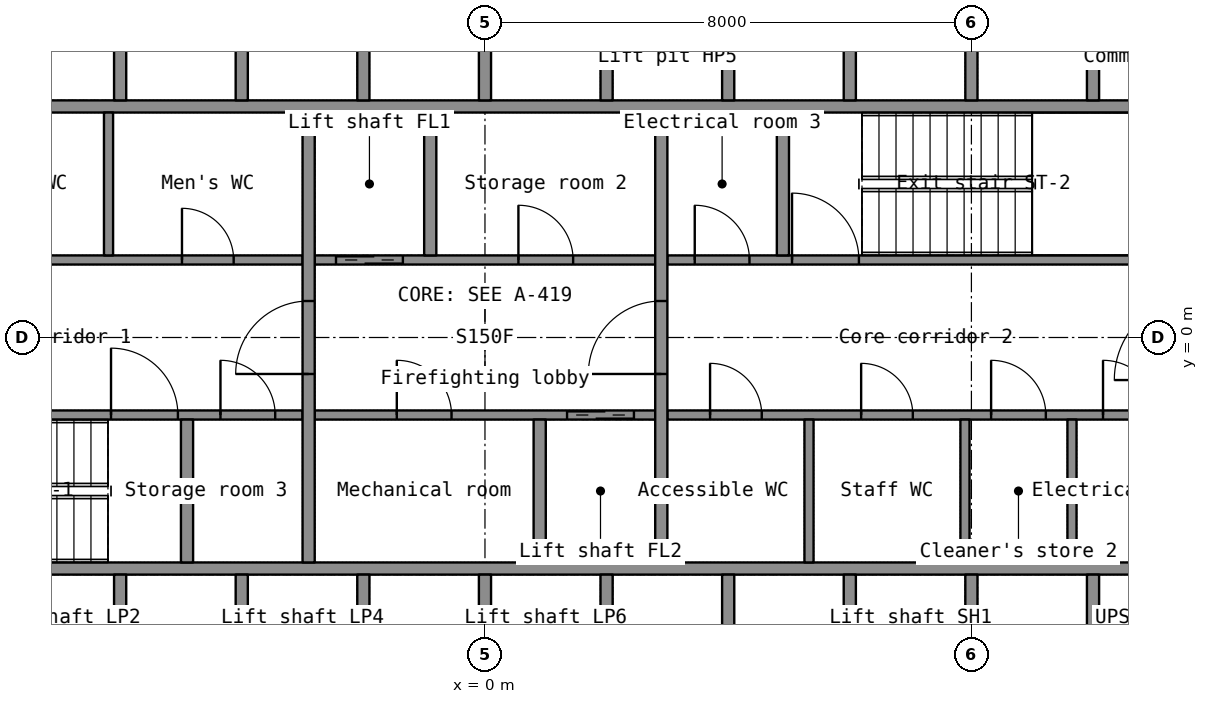
"""IFC4 building model, lengths in metres.
Left out: names, types, materials, properties, quantities, classifications, styles, units other than length and angle.
Written with IfcOpenShell. Run it as: python <this file> out.ifc"""

import sys

from ifc_helpers import new_model, si_unit, direction, frame, frame_2d, origin, place, context, subcontext, project, spatial, rectangle, extrude, element, fill, save


model = new_model("IFC4")
c1 = context("Model", 3, precision=1e-05, world=origin(), true_north=direction((0.0, 1.0)))
c2 = subcontext(c1, "Body", "Model", "MODEL_VIEW")
j1 = project(units=[si_unit("LENGTHUNIT", "METRE"), si_unit("PLANEANGLEUNIT", "RADIAN")], contexts=[c1])
p1 = place(None, origin())
s1 = spatial("IfcSite", under=j1, at=p1, CompositionType="ELEMENT")
p2 = place(p1, origin())
s2 = spatial("IfcBuilding", under=s1, at=p2, CompositionType="ELEMENT")
p3 = place(p2, frame((0.0, 0.0, 141.5)))
s3 = spatial("IfcBuildingStorey", under=s2, at=p3, CompositionType="ELEMENT", Elevation=141.5)
for number, where, z_axis, x_axis in (
    (1, (-11.5, -3.8, 0.0), (0.0, 0.0, 1.0), (1.0, 0.0, 0.0)),
    (2, (-11.5, 3.8, 0.0), (0.0, 0.0, 1.0), (1.0, 0.0, 0.0)),
):
    element("IfcWall", number, at=place(p3, frame(where, z_axis=z_axis, x_axis=x_axis)), inside=s3, PredefinedType="SHEAR", context=c2, shape_type="SweptSolid", body=[
        extrude(rectangle(XDim=23.0, YDim=0.2, at=frame_2d((11.5, 0.0))), origin(), (0.0, 0.0, 1.0), 3.3),
    ])
for number, where, z_axis, x_axis in (
    (3, (-6.0, -6.7, 0.0), (0.0, 0.0, 1.0), (0.0, 1.0, 0.0)),
    (4, (-4.0, -6.7, 0.0), (0.0, 0.0, 1.0), (0.0, 1.0, 0.0)),
    (5, (-2.0, -6.7, 0.0), (0.0, 0.0, 1.0), (0.0, 1.0, 0.0)),
    (6, (0.0, -6.7, 0.0), (0.0, 0.0, 1.0), (0.0, 1.0, 0.0)),
    (7, (2.0, -6.7, 0.0), (0.0, 0.0, 1.0), (0.0, 1.0, 0.0)),
    (8, (4.0, -6.7, 0.0), (0.0, 0.0, 1.0), (0.0, 1.0, 0.0)),
    (9, (6.0, -6.7, 0.0), (0.0, 0.0, 1.0), (0.0, 1.0, 0.0)),
    (10, (8.0, -6.7, 0.0), (0.0, 0.0, 1.0), (0.0, 1.0, 0.0)),
    (11, (10.0, -6.7, 0.0), (0.0, 0.0, 1.0), (0.0, 1.0, 0.0)),
    (12, (-6.0, 3.9, 0.0), (0.0, 0.0, 1.0), (0.0, 1.0, 0.0)),
    (13, (-4.0, 3.9, 0.0), (0.0, 0.0, 1.0), (0.0, 1.0, 0.0)),
    (14, (-2.0, 3.9, 0.0), (0.0, 0.0, 1.0), (0.0, 1.0, 0.0)),
    (15, (0.0, 3.9, 0.0), (0.0, 0.0, 1.0), (0.0, 1.0, 0.0)),
    (16, (2.0, 3.9, 0.0), (0.0, 0.0, 1.0), (0.0, 1.0, 0.0)),
    (17, (4.0, 3.9, 0.0), (0.0, 0.0, 1.0), (0.0, 1.0, 0.0)),
    (18, (6.0, 3.9, 0.0), (0.0, 0.0, 1.0), (0.0, 1.0, 0.0)),
    (19, (8.0, 3.9, 0.0), (0.0, 0.0, 1.0), (0.0, 1.0, 0.0)),
    (20, (10.0, 3.9, 0.0), (0.0, 0.0, 1.0), (0.0, 1.0, 0.0)),
):
    element("IfcWall", number, at=place(p3, frame(where, z_axis=z_axis, x_axis=x_axis)), inside=s3, PredefinedType="SHEAR", context=c2, shape_type="SweptSolid", body=[
        extrude(rectangle(XDim=2.8, YDim=0.2, at=frame_2d((1.4, 0.0))), origin(), (0.0, 0.0, 1.0), 3.3),
    ])
p4 = place(p3, frame((-11.5, -1.275, 0.0), z_axis=(0.0, 0.0, 1.0), x_axis=(1.0, 0.0, 0.0)))
e21 = element("IfcWall", 21, at=p4, inside=s3, PredefinedType="SHEAR", context=c2, shape_type="SweptSolid", body=[
    extrude(rectangle(XDim=8.5, YDim=0.15, at=frame_2d((4.25, 0.0))), origin(), (0.0, 0.0, 1.0), 3.3),
])
p5 = place(p4, frame((5.35, 0.0, 0.0)))
e22 = element("IfcOpeningElement", 22, at=p5, cuts=e21, PredefinedType="OPENING", context=c2, shape_type="SweptSolid", body=[
    extrude(rectangle(XDim=1.1, YDim=2.15, at=frame_2d((0.55, 1.075))), frame((0.0, 0.085, 0.0), z_axis=(0.0, -1.0, 0.0), x_axis=(1.0, 0.0, 0.0)), (0.0, 0.0, 1.0), 0.17),
])
p6 = place(p4, frame((7.15, 0.0, 0.0)))
e23 = element("IfcOpeningElement", 23, at=p6, cuts=e21, PredefinedType="OPENING", context=c2, shape_type="SweptSolid", body=[
    extrude(rectangle(XDim=0.9, YDim=2.1, at=frame_2d((0.45, 1.05))), frame((0.0, 0.085, 0.0), z_axis=(0.0, -1.0, 0.0), x_axis=(1.0, 0.0, 0.0)), (0.0, 0.0, 1.0), 0.17),
])
p7 = place(p3, frame((-2.8, -1.275, 0.0), z_axis=(0.0, 0.0, 1.0), x_axis=(1.0, 0.0, 0.0)))
e24 = element("IfcWall", 24, at=p7, inside=s3, PredefinedType="SHEAR", context=c2, shape_type="SweptSolid", body=[
    extrude(rectangle(XDim=5.6, YDim=0.15, at=frame_2d((2.8, 0.0))), origin(), (0.0, 0.0, 1.0), 3.3),
])
p8 = place(p7, frame((4.15, 0.0, 0.0)))
e25 = element("IfcOpeningElement", 25, at=p8, cuts=e24, PredefinedType="OPENING", context=c2, shape_type="SweptSolid", body=[
    extrude(rectangle(XDim=1.1, YDim=2.2, at=frame_2d((0.55, 1.1))), frame((0.0, 0.085, 0.0), z_axis=(0.0, -1.0, 0.0), x_axis=(1.0, 0.0, 0.0)), (0.0, 0.0, 1.0), 0.17),
])
p9 = place(p7, frame((1.35, 0.0, 0.0)))
e26 = element("IfcOpeningElement", 26, at=p9, cuts=e24, PredefinedType="OPENING", context=c2, shape_type="SweptSolid", body=[
    extrude(rectangle(XDim=0.9, YDim=2.1, at=frame_2d((0.45, 1.05))), frame((0.0, 0.085, 0.0), z_axis=(0.0, -1.0, 0.0), x_axis=(1.0, 0.0, 0.0)), (0.0, 0.0, 1.0), 0.17),
])
p10 = place(p3, frame((3.0, -1.275, 0.0), z_axis=(0.0, 0.0, 1.0), x_axis=(1.0, 0.0, 0.0)))
e27 = element("IfcWall", 27, at=p10, inside=s3, PredefinedType="PARTITIONING", context=c2, shape_type="SweptSolid", body=[
    extrude(rectangle(XDim=8.5, YDim=0.15, at=frame_2d((4.25, 0.0))), origin(), (0.0, 0.0, 1.0), 3.3),
])
p11 = place(p10, frame((0.702, 0.0, 0.0)))
e28 = element("IfcOpeningElement", 28, at=p11, cuts=e27, PredefinedType="OPENING", context=c2, shape_type="SweptSolid", body=[
    extrude(rectangle(XDim=0.85, YDim=2.1, at=frame_2d((0.425, 1.05))), frame((0.0, 0.085, 0.0), z_axis=(0.0, -1.0, 0.0), x_axis=(1.0, 0.0, 0.0)), (0.0, 0.0, 1.0), 0.17),
])
p12 = place(p10, frame((3.187, 0.0, 0.0)))
e29 = element("IfcOpeningElement", 29, at=p12, cuts=e27, PredefinedType="OPENING", context=c2, shape_type="SweptSolid", body=[
    extrude(rectangle(XDim=0.85, YDim=2.1, at=frame_2d((0.425, 1.05))), frame((0.0, 0.085, 0.0), z_axis=(0.0, -1.0, 0.0), x_axis=(1.0, 0.0, 0.0)), (0.0, 0.0, 1.0), 0.17),
])
p13 = place(p10, frame((5.324, 0.0, 0.0)))
e30 = element("IfcOpeningElement", 30, at=p13, cuts=e27, PredefinedType="OPENING", context=c2, shape_type="SweptSolid", body=[
    extrude(rectangle(XDim=0.9, YDim=2.1, at=frame_2d((0.45, 1.05))), frame((0.0, 0.085, 0.0), z_axis=(0.0, -1.0, 0.0), x_axis=(1.0, 0.0, 0.0)), (0.0, 0.0, 1.0), 0.17),
])
p14 = place(p10, frame((7.165, 0.0, 0.0)))
e31 = element("IfcOpeningElement", 31, at=p14, cuts=e27, PredefinedType="OPENING", context=c2, shape_type="SweptSolid", body=[
    extrude(rectangle(XDim=0.9, YDim=2.1, at=frame_2d((0.45, 1.05))), frame((0.0, 0.085, 0.0), z_axis=(0.0, -1.0, 0.0), x_axis=(1.0, 0.0, 0.0)), (0.0, 0.0, 1.0), 0.17),
])
p15 = place(p3, frame((-11.5, 1.275, 0.0), z_axis=(0.0, 0.0, 1.0), x_axis=(1.0, 0.0, 0.0)))
e32 = element("IfcWall", 32, at=p15, inside=s3, PredefinedType="PARTITIONING", context=c2, shape_type="SweptSolid", body=[
    extrude(rectangle(XDim=8.5, YDim=0.15, at=frame_2d((4.25, 0.0))), origin(), (0.0, 0.0, 1.0), 3.3),
])
p16 = place(p15, frame((0.534, 0.0, 0.0)))
e33 = element("IfcOpeningElement", 33, at=p16, cuts=e32, PredefinedType="OPENING", context=c2, shape_type="SweptSolid", body=[
    extrude(rectangle(XDim=0.9, YDim=2.1, at=frame_2d((0.45, 1.05))), frame((0.0, 0.085, 0.0), z_axis=(0.0, -1.0, 0.0), x_axis=(1.0, 0.0, 0.0)), (0.0, 0.0, 1.0), 0.17),
])
p17 = place(p15, frame((3.251, 0.0, 0.0)))
e34 = element("IfcOpeningElement", 34, at=p17, cuts=e32, PredefinedType="OPENING", context=c2, shape_type="SweptSolid", body=[
    extrude(rectangle(XDim=0.85, YDim=2.1, at=frame_2d((0.425, 1.05))), frame((0.0, 0.085, 0.0), z_axis=(0.0, -1.0, 0.0), x_axis=(1.0, 0.0, 0.0)), (0.0, 0.0, 1.0), 0.17),
])
p18 = place(p15, frame((6.517, 0.0, 0.0)))
e35 = element("IfcOpeningElement", 35, at=p18, cuts=e32, PredefinedType="OPENING", context=c2, shape_type="SweptSolid", body=[
    extrude(rectangle(XDim=0.85, YDim=2.1, at=frame_2d((0.425, 1.05))), frame((0.0, 0.085, 0.0), z_axis=(0.0, -1.0, 0.0), x_axis=(1.0, 0.0, 0.0)), (0.0, 0.0, 1.0), 0.17),
])
p19 = place(p3, frame((-2.8, 1.275, 0.0), z_axis=(0.0, 0.0, 1.0), x_axis=(1.0, 0.0, 0.0)))
e36 = element("IfcWall", 36, at=p19, inside=s3, PredefinedType="SHEAR", context=c2, shape_type="SweptSolid", body=[
    extrude(rectangle(XDim=5.6, YDim=0.15, at=frame_2d((2.8, 0.0))), origin(), (0.0, 0.0, 1.0), 3.3),
])
p20 = place(p19, frame((0.35, 0.0, 0.0)))
e37 = element("IfcOpeningElement", 37, at=p20, cuts=e36, PredefinedType="OPENING", context=c2, shape_type="SweptSolid", body=[
    extrude(rectangle(XDim=1.1, YDim=2.2, at=frame_2d((0.55, 1.1))), frame((0.0, 0.085, 0.0), z_axis=(0.0, -1.0, 0.0), x_axis=(1.0, 0.0, 0.0)), (0.0, 0.0, 1.0), 0.17),
])
p21 = place(p19, frame((3.35, 0.0, 0.0)))
e38 = element("IfcOpeningElement", 38, at=p21, cuts=e36, PredefinedType="OPENING", context=c2, shape_type="SweptSolid", body=[
    extrude(rectangle(XDim=0.9, YDim=2.1, at=frame_2d((0.45, 1.05))), frame((0.0, 0.085, 0.0), z_axis=(0.0, -1.0, 0.0), x_axis=(1.0, 0.0, 0.0)), (0.0, 0.0, 1.0), 0.17),
])
p22 = place(p3, frame((3.0, 1.275, 0.0), z_axis=(0.0, 0.0, 1.0), x_axis=(1.0, 0.0, 0.0)))
e39 = element("IfcWall", 39, at=p22, inside=s3, PredefinedType="SHEAR", context=c2, shape_type="SweptSolid", body=[
    extrude(rectangle(XDim=8.5, YDim=0.15, at=frame_2d((4.25, 0.0))), origin(), (0.0, 0.0, 1.0), 3.3),
])
p23 = place(p22, frame((2.05, 0.0, 0.0)))
e40 = element("IfcOpeningElement", 40, at=p23, cuts=e39, PredefinedType="OPENING", context=c2, shape_type="SweptSolid", body=[
    extrude(rectangle(XDim=1.1, YDim=2.15, at=frame_2d((0.55, 1.075))), frame((0.0, 0.085, 0.0), z_axis=(0.0, -1.0, 0.0), x_axis=(1.0, 0.0, 0.0)), (0.0, 0.0, 1.0), 0.17),
])
p24 = place(p22, frame((0.45, 0.0, 0.0)))
e41 = element("IfcOpeningElement", 41, at=p24, cuts=e39, PredefinedType="OPENING", context=c2, shape_type="SweptSolid", body=[
    extrude(rectangle(XDim=0.9, YDim=2.1, at=frame_2d((0.45, 1.05))), frame((0.0, 0.085, 0.0), z_axis=(0.0, -1.0, 0.0), x_axis=(1.0, 0.0, 0.0)), (0.0, 0.0, 1.0), 0.17),
])
p25 = place(p3, frame((-2.9, -3.7, 0.0), z_axis=(0.0, 0.0, 1.0), x_axis=(0.0, 1.0, 0.0)))
e42 = element("IfcWall", 42, at=p25, inside=s3, PredefinedType="SHEAR", context=c2, shape_type="SweptSolid", body=[
    extrude(rectangle(XDim=7.4, YDim=0.2, at=frame_2d((3.7, 0.0))), origin(), (0.0, 0.0, 1.0), 3.3),
])
p26 = place(p25, frame((3.1, 0.0, 0.0)))
e43 = element("IfcOpeningElement", 43, at=p26, cuts=e42, PredefinedType="OPENING", context=c2, shape_type="SweptSolid", body=[
    extrude(rectangle(XDim=1.2, YDim=2.2, at=frame_2d((0.6, 1.1))), frame((0.0, 0.11, 0.0), z_axis=(0.0, -1.0, 0.0), x_axis=(1.0, 0.0, 0.0)), (0.0, 0.0, 1.0), 0.22),
])
p27 = place(p3, frame((2.9, -3.7, 0.0), z_axis=(0.0, 0.0, 1.0), x_axis=(0.0, 1.0, 0.0)))
e44 = element("IfcWall", 44, at=p27, inside=s3, PredefinedType="SHEAR", context=c2, shape_type="SweptSolid", body=[
    extrude(rectangle(XDim=7.4, YDim=0.2, at=frame_2d((3.7, 0.0))), origin(), (0.0, 0.0, 1.0), 3.3),
])
p28 = place(p27, frame((3.1, 0.0, 0.0)))
e45 = element("IfcOpeningElement", 45, at=p28, cuts=e44, PredefinedType="OPENING", context=c2, shape_type="SweptSolid", body=[
    extrude(rectangle(XDim=1.2, YDim=2.2, at=frame_2d((0.6, 1.1))), frame((0.0, 0.11, 0.0), z_axis=(0.0, -1.0, 0.0), x_axis=(1.0, 0.0, 0.0)), (0.0, 0.0, 1.0), 0.22),
])
for number, where, z_axis, x_axis in (
    (46, (-0.9, 1.35, 0.0), (0.0, 0.0, 1.0), (0.0, 1.0, 0.0)),
    (47, (0.9, -3.7, 0.0), (0.0, 0.0, 1.0), (0.0, 1.0, 0.0)),
    (48, (-4.9, -3.7, 0.0), (0.0, 0.0, 1.0), (0.0, 1.0, 0.0)),
    (49, (4.9, 1.35, 0.0), (0.0, 0.0, 1.0), (0.0, 1.0, 0.0)),
):
    element("IfcWall", number, at=place(p3, frame(where, z_axis=z_axis, x_axis=x_axis)), inside=s3, PredefinedType="SHEAR", context=c2, shape_type="SweptSolid", body=[
        extrude(rectangle(XDim=2.35, YDim=0.2, at=frame_2d((1.175, 0.0))), origin(), (0.0, 0.0, 1.0), 3.3),
    ])
for number, where, z_axis, x_axis in (
    (50, (-6.191, 1.35, 0.0), (0.0, 0.0, 1.0), (0.0, 1.0, 0.0)),
    (51, (5.329, -3.7, 0.0), (0.0, 0.0, 1.0), (0.0, 1.0, 0.0)),
    (52, (7.894, -3.7, 0.0), (0.0, 0.0, 1.0), (0.0, 1.0, 0.0)),
    (53, (9.654, -3.7, 0.0), (0.0, 0.0, 1.0), (0.0, 1.0, 0.0)),
):
    element("IfcWall", number, at=place(p3, frame(where, z_axis=z_axis, x_axis=x_axis)), inside=s3, PredefinedType="PARTITIONING", context=c2, shape_type="SweptSolid", body=[
        extrude(rectangle(XDim=2.35, YDim=0.15, at=frame_2d((1.175, 0.0))), origin(), (0.0, 0.0, 1.0), 3.3),
    ])
p29 = place(p26, origin())
e54 = element("IfcDoor", 54, at=p29, inside=s3, OperationType="SINGLE_SWING_LEFT", PredefinedType="DOOR", context=c2, shape_type="SweptSolid", body=[
    extrude(rectangle(XDim=1.2, YDim=2.2, at=frame_2d((0.6, 1.1))), frame((0.0, 0.025, 0.0), z_axis=(0.0, -1.0, 0.0), x_axis=(1.0, 0.0, 0.0)), (0.0, 0.0, 1.0), 0.05),
])
fill(e43, e54)
p30 = place(p28, origin())
e55 = element("IfcDoor", 55, at=p30, inside=s3, OperationType="SINGLE_SWING_LEFT", PredefinedType="DOOR", context=c2, shape_type="SweptSolid", body=[
    extrude(rectangle(XDim=1.2, YDim=2.2, at=frame_2d((0.6, 1.1))), frame((0.0, 0.025, 0.0), z_axis=(0.0, -1.0, 0.0), x_axis=(1.0, 0.0, 0.0)), (0.0, 0.0, 1.0), 0.05),
])
fill(e45, e55)
p31 = place(p20, origin())
e56 = element("IfcDoor", 56, at=p31, inside=s3, OperationType="DOUBLE_DOOR_SLIDING", PredefinedType="DOOR", context=c2, shape_type="SweptSolid", body=[
    extrude(rectangle(XDim=1.1, YDim=2.2, at=frame_2d((0.55, 1.1))), frame((0.0, 0.025, 0.0), z_axis=(0.0, -1.0, 0.0), x_axis=(1.0, 0.0, 0.0)), (0.0, 0.0, 1.0), 0.05),
])
fill(e37, e56)
p32 = place(p8, origin())
e57 = element("IfcDoor", 57, at=p32, inside=s3, OperationType="DOUBLE_DOOR_SLIDING", PredefinedType="DOOR", context=c2, shape_type="SweptSolid", body=[
    extrude(rectangle(XDim=1.1, YDim=2.2, at=frame_2d((0.55, 1.1))), frame((0.0, 0.025, 0.0), z_axis=(0.0, -1.0, 0.0), x_axis=(1.0, 0.0, 0.0)), (0.0, 0.0, 1.0), 0.05),
])
fill(e25, e57)
p33 = place(p5, origin())
e58 = element("IfcDoor", 58, at=p33, inside=s3, OperationType="SINGLE_SWING_LEFT", PredefinedType="DOOR", context=c2, shape_type="SweptSolid", body=[
    extrude(rectangle(XDim=1.1, YDim=2.15, at=frame_2d((0.55, 1.075))), frame((0.0, 0.025, 0.0), z_axis=(0.0, -1.0, 0.0), x_axis=(1.0, 0.0, 0.0)), (0.0, 0.0, 1.0), 0.05),
])
fill(e22, e58)
p34 = place(p23, origin())
e59 = element("IfcDoor", 59, at=p34, inside=s3, OperationType="SINGLE_SWING_LEFT", PredefinedType="DOOR", context=c2, shape_type="SweptSolid", body=[
    extrude(rectangle(XDim=1.1, YDim=2.15, at=frame_2d((0.55, 1.075))), frame((0.0, 0.025, 0.0), z_axis=(0.0, -1.0, 0.0), x_axis=(1.0, 0.0, 0.0)), (0.0, 0.0, 1.0), 0.05),
])
fill(e40, e59)
p35 = place(p18, origin())
e60 = element("IfcDoor", 60, at=p35, inside=s3, OperationType="SINGLE_SWING_LEFT", PredefinedType="DOOR", context=c2, shape_type="SweptSolid", body=[
    extrude(rectangle(XDim=0.85, YDim=2.1, at=frame_2d((0.425, 1.05))), frame((0.0, 0.025, 0.0), z_axis=(0.0, -1.0, 0.0), x_axis=(1.0, 0.0, 0.0)), (0.0, 0.0, 1.0), 0.05),
])
fill(e35, e60)
p36 = place(p11, origin())
e61 = element("IfcDoor", 61, at=p36, inside=s3, OperationType="SINGLE_SWING_LEFT", PredefinedType="DOOR", context=c2, shape_type="SweptSolid", body=[
    extrude(rectangle(XDim=0.85, YDim=2.1, at=frame_2d((0.425, 1.05))), frame((0.0, 0.025, 0.0), z_axis=(0.0, -1.0, 0.0), x_axis=(1.0, 0.0, 0.0)), (0.0, 0.0, 1.0), 0.05),
])
fill(e28, e61)
p37 = place(p12, origin())
e62 = element("IfcDoor", 62, at=p37, inside=s3, OperationType="SINGLE_SWING_LEFT", PredefinedType="DOOR", context=c2, shape_type="SweptSolid", body=[
    extrude(rectangle(XDim=0.85, YDim=2.1, at=frame_2d((0.425, 1.05))), frame((0.0, 0.025, 0.0), z_axis=(0.0, -1.0, 0.0), x_axis=(1.0, 0.0, 0.0)), (0.0, 0.0, 1.0), 0.05),
])
fill(e29, e62)
p38 = place(p13, origin())
e63 = element("IfcDoor", 63, at=p38, inside=s3, OperationType="SINGLE_SWING_LEFT", PredefinedType="DOOR", context=c2, shape_type="SweptSolid", body=[
    extrude(rectangle(XDim=0.9, YDim=2.1, at=frame_2d((0.45, 1.05))), frame((0.0, 0.025, 0.0), z_axis=(0.0, -1.0, 0.0), x_axis=(1.0, 0.0, 0.0)), (0.0, 0.0, 1.0), 0.05),
])
fill(e30, e63)
p39 = place(p14, origin())
e64 = element("IfcDoor", 64, at=p39, inside=s3, OperationType="SINGLE_SWING_LEFT", PredefinedType="DOOR", context=c2, shape_type="SweptSolid", body=[
    extrude(rectangle(XDim=0.9, YDim=2.1, at=frame_2d((0.45, 1.05))), frame((0.0, 0.025, 0.0), z_axis=(0.0, -1.0, 0.0), x_axis=(1.0, 0.0, 0.0)), (0.0, 0.0, 1.0), 0.05),
])
fill(e31, e64)
p40 = place(p21, origin())
e65 = element("IfcDoor", 65, at=p40, inside=s3, OperationType="SINGLE_SWING_LEFT", PredefinedType="DOOR", context=c2, shape_type="SweptSolid", body=[
    extrude(rectangle(XDim=0.9, YDim=2.1, at=frame_2d((0.45, 1.05))), frame((0.0, 0.025, 0.0), z_axis=(0.0, -1.0, 0.0), x_axis=(1.0, 0.0, 0.0)), (0.0, 0.0, 1.0), 0.05),
])
fill(e38, e65)
p41 = place(p9, origin())
e66 = element("IfcDoor", 66, at=p41, inside=s3, OperationType="SINGLE_SWING_LEFT", PredefinedType="DOOR", context=c2, shape_type="SweptSolid", body=[
    extrude(rectangle(XDim=0.9, YDim=2.1, at=frame_2d((0.45, 1.05))), frame((0.0, 0.025, 0.0), z_axis=(0.0, -1.0, 0.0), x_axis=(1.0, 0.0, 0.0)), (0.0, 0.0, 1.0), 0.05),
])
fill(e26, e66)
p42 = place(p24, origin())
e67 = element("IfcDoor", 67, at=p42, inside=s3, OperationType="SINGLE_SWING_LEFT", PredefinedType="DOOR", context=c2, shape_type="SweptSolid", body=[
    extrude(rectangle(XDim=0.9, YDim=2.1, at=frame_2d((0.45, 1.05))), frame((0.0, 0.025, 0.0), z_axis=(0.0, -1.0, 0.0), x_axis=(1.0, 0.0, 0.0)), (0.0, 0.0, 1.0), 0.05),
])
fill(e41, e67)
p43 = place(p6, origin())
e68 = element("IfcDoor", 68, at=p43, inside=s3, OperationType="SINGLE_SWING_LEFT", PredefinedType="DOOR", context=c2, shape_type="SweptSolid", body=[
    extrude(rectangle(XDim=0.9, YDim=2.1, at=frame_2d((0.45, 1.05))), frame((0.0, 0.025, 0.0), z_axis=(0.0, -1.0, 0.0), x_axis=(1.0, 0.0, 0.0)), (0.0, 0.0, 1.0), 0.05),
])
fill(e23, e68)
save(model, sys.argv[1])
